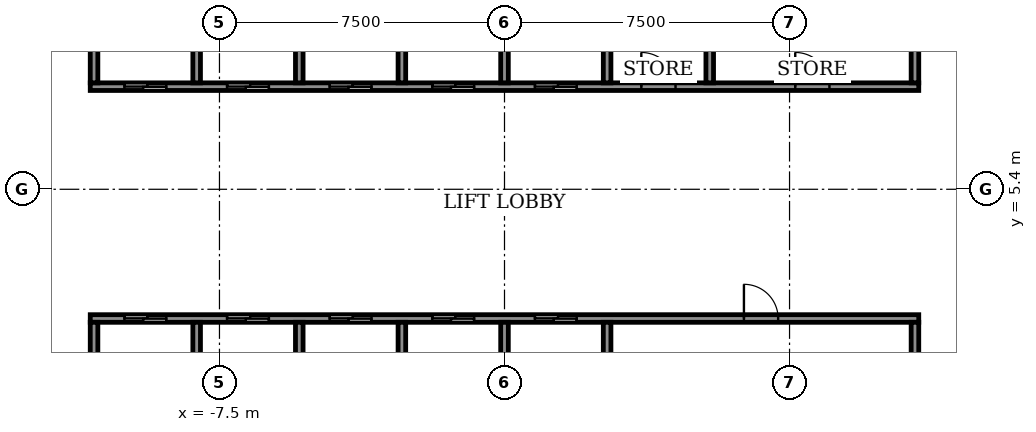
"""IFC4 building model, lengths in metres.
Left out: names, types, materials, properties, quantities, classifications, styles, units other than length and angle.
Written with IfcOpenShell. Run it as: python <this file> out.ifc"""

import sys

from ifc_helpers import new_model, si_unit, direction, frame, frame_2d, origin, place, context, subcontext, project, spatial, rectangle, extrude, element, fill, save


model = new_model("IFC4")
c1 = context("Model", 3, precision=1e-05, world=origin(), true_north=direction((0.0, 1.0)))
c2 = subcontext(c1, "Body", "Model", "MODEL_VIEW")
j1 = project(units=[si_unit("LENGTHUNIT", "METRE"), si_unit("PLANEANGLEUNIT", "RADIAN")], contexts=[c1])
p1 = place(None, origin())
s1 = spatial("IfcSite", under=j1, at=p1, CompositionType="ELEMENT")
p2 = place(p1, origin())
s2 = spatial("IfcBuilding", under=s1, at=p2, CompositionType="ELEMENT")
p3 = place(p2, frame((0.0, 0.0, 20.5)))
s3 = spatial("IfcBuildingStorey", under=s2, at=p3, CompositionType="ELEMENT", Elevation=20.5)
p4 = place(p3, frame((-10.9, 2.0, 0.0), z_axis=(0.0, 0.0, 1.0), x_axis=(1.0, 0.0, 0.0)))
e1 = element("IfcWall", 1, at=p4, inside=s3, PredefinedType="SHEAR", context=c2, shape_type="SweptSolid", body=[
    extrude(rectangle(XDim=21.8, YDim=0.2, at=frame_2d((10.9, 0.0))), origin(), (0.0, 0.0, 1.0), 3.95),
])
p5 = place(p4, frame((0.9, 0.0, 0.0)))
e2 = element("IfcOpeningElement", 2, at=p5, cuts=e1, PredefinedType="OPENING", context=c2, shape_type="SweptSolid", body=[
    extrude(rectangle(XDim=1.1, YDim=2.1, at=frame_2d((0.55, 1.05))), frame((0.0, 0.11, 0.0), z_axis=(0.0, -1.0, 0.0), x_axis=(1.0, 0.0, 0.0)), (0.0, 0.0, 1.0), 0.22),
])
p6 = place(p4, frame((3.6, 0.0, 0.0)))
e3 = element("IfcOpeningElement", 3, at=p6, cuts=e1, PredefinedType="OPENING", context=c2, shape_type="SweptSolid", body=[
    extrude(rectangle(XDim=1.1, YDim=2.1, at=frame_2d((0.55, 1.05))), frame((0.0, 0.11, 0.0), z_axis=(0.0, -1.0, 0.0), x_axis=(1.0, 0.0, 0.0)), (0.0, 0.0, 1.0), 0.22),
])
p7 = place(p4, frame((6.3, 0.0, 0.0)))
e4 = element("IfcOpeningElement", 4, at=p7, cuts=e1, PredefinedType="OPENING", context=c2, shape_type="SweptSolid", body=[
    extrude(rectangle(XDim=1.1, YDim=2.1, at=frame_2d((0.55, 1.05))), frame((0.0, 0.11, 0.0), z_axis=(0.0, -1.0, 0.0), x_axis=(1.0, 0.0, 0.0)), (0.0, 0.0, 1.0), 0.22),
])
p8 = place(p4, frame((9.0, 0.0, 0.0)))
e5 = element("IfcOpeningElement", 5, at=p8, cuts=e1, PredefinedType="OPENING", context=c2, shape_type="SweptSolid", body=[
    extrude(rectangle(XDim=1.1, YDim=2.1, at=frame_2d((0.55, 1.05))), frame((0.0, 0.11, 0.0), z_axis=(0.0, -1.0, 0.0), x_axis=(1.0, 0.0, 0.0)), (0.0, 0.0, 1.0), 0.22),
])
p9 = place(p4, frame((11.7, 0.0, 0.0)))
e6 = element("IfcOpeningElement", 6, at=p9, cuts=e1, PredefinedType="OPENING", context=c2, shape_type="SweptSolid", body=[
    extrude(rectangle(XDim=1.1, YDim=2.1, at=frame_2d((0.55, 1.05))), frame((0.0, 0.11, 0.0), z_axis=(0.0, -1.0, 0.0), x_axis=(1.0, 0.0, 0.0)), (0.0, 0.0, 1.0), 0.22),
])
p10 = place(p4, frame((17.2, 0.0, 0.0)))
e7 = element("IfcOpeningElement", 7, at=p10, cuts=e1, PredefinedType="OPENING", context=c2, shape_type="SweptSolid", body=[
    extrude(rectangle(XDim=0.9, YDim=2.1, at=frame_2d((0.45, 1.05))), frame((0.0, 0.11, 0.0), z_axis=(0.0, -1.0, 0.0), x_axis=(1.0, 0.0, 0.0)), (0.0, 0.0, 1.0), 0.22),
])
p11 = place(p3, frame((-10.9, 8.1, 0.0), z_axis=(0.0, 0.0, 1.0), x_axis=(1.0, 0.0, 0.0)))
e8 = element("IfcWall", 8, at=p11, inside=s3, PredefinedType="SHEAR", context=c2, shape_type="SweptSolid", body=[
    extrude(rectangle(XDim=21.8, YDim=0.2, at=frame_2d((10.9, 0.0))), origin(), (0.0, 0.0, 1.0), 3.95),
])
p12 = place(p11, frame((0.9, 0.0, 0.0)))
e9 = element("IfcOpeningElement", 9, at=p12, cuts=e8, PredefinedType="OPENING", context=c2, shape_type="SweptSolid", body=[
    extrude(rectangle(XDim=1.1, YDim=2.1, at=frame_2d((0.55, 1.05))), frame((0.0, 0.11, 0.0), z_axis=(0.0, -1.0, 0.0), x_axis=(1.0, 0.0, 0.0)), (0.0, 0.0, 1.0), 0.22),
])
p13 = place(p11, frame((3.6, 0.0, 0.0)))
e10 = element("IfcOpeningElement", 10, at=p13, cuts=e8, PredefinedType="OPENING", context=c2, shape_type="SweptSolid", body=[
    extrude(rectangle(XDim=1.1, YDim=2.1, at=frame_2d((0.55, 1.05))), frame((0.0, 0.11, 0.0), z_axis=(0.0, -1.0, 0.0), x_axis=(1.0, 0.0, 0.0)), (0.0, 0.0, 1.0), 0.22),
])
p14 = place(p11, frame((6.3, 0.0, 0.0)))
e11 = element("IfcOpeningElement", 11, at=p14, cuts=e8, PredefinedType="OPENING", context=c2, shape_type="SweptSolid", body=[
    extrude(rectangle(XDim=1.1, YDim=2.1, at=frame_2d((0.55, 1.05))), frame((0.0, 0.11, 0.0), z_axis=(0.0, -1.0, 0.0), x_axis=(1.0, 0.0, 0.0)), (0.0, 0.0, 1.0), 0.22),
])
p15 = place(p11, frame((9.0, 0.0, 0.0)))
e12 = element("IfcOpeningElement", 12, at=p15, cuts=e8, PredefinedType="OPENING", context=c2, shape_type="SweptSolid", body=[
    extrude(rectangle(XDim=1.1, YDim=2.1, at=frame_2d((0.55, 1.05))), frame((0.0, 0.11, 0.0), z_axis=(0.0, -1.0, 0.0), x_axis=(1.0, 0.0, 0.0)), (0.0, 0.0, 1.0), 0.22),
])
p16 = place(p11, frame((11.7, 0.0, 0.0)))
e13 = element("IfcOpeningElement", 13, at=p16, cuts=e8, PredefinedType="OPENING", context=c2, shape_type="SweptSolid", body=[
    extrude(rectangle(XDim=1.1, YDim=2.1, at=frame_2d((0.55, 1.05))), frame((0.0, 0.11, 0.0), z_axis=(0.0, -1.0, 0.0), x_axis=(1.0, 0.0, 0.0)), (0.0, 0.0, 1.0), 0.22),
])
p17 = place(p11, frame((14.5, 0.0, 0.0)))
e14 = element("IfcOpeningElement", 14, at=p17, cuts=e8, PredefinedType="OPENING", context=c2, shape_type="SweptSolid", body=[
    extrude(rectangle(XDim=0.9, YDim=2.1, at=frame_2d((0.45, 1.05))), frame((0.0, 0.11, 0.0), z_axis=(0.0, -1.0, 0.0), x_axis=(1.0, 0.0, 0.0)), (0.0, 0.0, 1.0), 0.22),
])
p18 = place(p11, frame((18.55, 0.0, 0.0)))
e15 = element("IfcOpeningElement", 15, at=p18, cuts=e8, PredefinedType="OPENING", context=c2, shape_type="SweptSolid", body=[
    extrude(rectangle(XDim=0.9, YDim=2.1, at=frame_2d((0.45, 1.05))), frame((0.0, 0.11, 0.0), z_axis=(0.0, -1.0, 0.0), x_axis=(1.0, 0.0, 0.0)), (0.0, 0.0, 1.0), 0.22),
])
for number, where, z_axis, x_axis in (
    (16, (-10.8, -0.6, 0.0), (0.0, 0.0, 1.0), (0.0, 1.0, 0.0)),
    (17, (-8.1, -0.6, 0.0), (0.0, 0.0, 1.0), (0.0, 1.0, 0.0)),
    (18, (-5.4, -0.6, 0.0), (0.0, 0.0, 1.0), (0.0, 1.0, 0.0)),
    (19, (-2.7, -0.6, 0.0), (0.0, 0.0, 1.0), (0.0, 1.0, 0.0)),
    (20, (0.0, -0.6, 0.0), (0.0, 0.0, 1.0), (0.0, 1.0, 0.0)),
    (21, (2.7, -0.6, 0.0), (0.0, 0.0, 1.0), (0.0, 1.0, 0.0)),
):
    element("IfcWall", number, at=place(p3, frame(where, z_axis=z_axis, x_axis=x_axis)), inside=s3, PredefinedType="SHEAR", context=c2, shape_type="SweptSolid", body=[
        extrude(rectangle(XDim=2.5, YDim=0.2, at=frame_2d((1.25, 0.0))), origin(), (0.0, 0.0, 1.0), 3.95),
    ])
p19 = place(p3, frame((10.8, -0.6, 0.0), z_axis=(0.0, 0.0, 1.0), x_axis=(0.0, 1.0, 0.0)))
e22 = element("IfcWall", 22, at=p19, inside=s3, PredefinedType="STANDARD", context=c2, shape_type="SweptSolid", body=[
    extrude(rectangle(XDim=2.5, YDim=0.2, at=frame_2d((1.25, 0.0))), origin(), (0.0, 0.0, 1.0), 3.95),
])
for number, where, z_axis, x_axis in (
    (23, (-10.8, 8.2, 0.0), (0.0, 0.0, 1.0), (0.0, 1.0, 0.0)),
    (24, (-8.1, 8.2, 0.0), (0.0, 0.0, 1.0), (0.0, 1.0, 0.0)),
    (25, (-5.4, 8.2, 0.0), (0.0, 0.0, 1.0), (0.0, 1.0, 0.0)),
    (26, (-2.7, 8.2, 0.0), (0.0, 0.0, 1.0), (0.0, 1.0, 0.0)),
    (27, (0.0, 8.2, 0.0), (0.0, 0.0, 1.0), (0.0, 1.0, 0.0)),
    (28, (2.7, 8.2, 0.0), (0.0, 0.0, 1.0), (0.0, 1.0, 0.0)),
):
    element("IfcWall", number, at=place(p3, frame(where, z_axis=z_axis, x_axis=x_axis)), inside=s3, PredefinedType="SHEAR", context=c2, shape_type="SweptSolid", body=[
        extrude(rectangle(XDim=2.6, YDim=0.2, at=frame_2d((1.3, 0.0))), origin(), (0.0, 0.0, 1.0), 3.95),
    ])
for number, where, z_axis, x_axis in (
    (29, (5.4, 8.2, 0.0), (0.0, 0.0, 1.0), (0.0, 1.0, 0.0)),
    (30, (10.8, 8.2, 0.0), (0.0, 0.0, 1.0), (0.0, 1.0, 0.0)),
):
    element("IfcWall", number, at=place(p3, frame(where, z_axis=z_axis, x_axis=x_axis)), inside=s3, PredefinedType="STANDARD", context=c2, shape_type="SweptSolid", body=[
        extrude(rectangle(XDim=2.6, YDim=0.2, at=frame_2d((1.3, 0.0))), origin(), (0.0, 0.0, 1.0), 3.95),
    ])
p20 = place(p5, origin())
e31 = element("IfcDoor", 31, at=p20, inside=s3, OperationType="SLIDING_TO_LEFT", PredefinedType="DOOR", context=c2, shape_type="SweptSolid", body=[
    extrude(rectangle(XDim=1.1, YDim=2.1, at=frame_2d((0.55, 1.05))), frame((0.0, 0.025, 0.0), z_axis=(0.0, -1.0, 0.0), x_axis=(1.0, 0.0, 0.0)), (0.0, 0.0, 1.0), 0.05),
])
fill(e2, e31)
p21 = place(p6, origin())
e32 = element("IfcDoor", 32, at=p21, inside=s3, OperationType="SLIDING_TO_LEFT", PredefinedType="DOOR", context=c2, shape_type="SweptSolid", body=[
    extrude(rectangle(XDim=1.1, YDim=2.1, at=frame_2d((0.55, 1.05))), frame((0.0, 0.025, 0.0), z_axis=(0.0, -1.0, 0.0), x_axis=(1.0, 0.0, 0.0)), (0.0, 0.0, 1.0), 0.05),
])
fill(e3, e32)
p22 = place(p7, origin())
e33 = element("IfcDoor", 33, at=p22, inside=s3, OperationType="SLIDING_TO_LEFT", PredefinedType="DOOR", context=c2, shape_type="SweptSolid", body=[
    extrude(rectangle(XDim=1.1, YDim=2.1, at=frame_2d((0.55, 1.05))), frame((0.0, 0.025, 0.0), z_axis=(0.0, -1.0, 0.0), x_axis=(1.0, 0.0, 0.0)), (0.0, 0.0, 1.0), 0.05),
])
fill(e4, e33)
p23 = place(p8, origin())
e34 = element("IfcDoor", 34, at=p23, inside=s3, OperationType="SLIDING_TO_LEFT", PredefinedType="DOOR", context=c2, shape_type="SweptSolid", body=[
    extrude(rectangle(XDim=1.1, YDim=2.1, at=frame_2d((0.55, 1.05))), frame((0.0, 0.025, 0.0), z_axis=(0.0, -1.0, 0.0), x_axis=(1.0, 0.0, 0.0)), (0.0, 0.0, 1.0), 0.05),
])
fill(e5, e34)
p24 = place(p9, origin())
e35 = element("IfcDoor", 35, at=p24, inside=s3, OperationType="SLIDING_TO_LEFT", PredefinedType="DOOR", context=c2, shape_type="SweptSolid", body=[
    extrude(rectangle(XDim=1.1, YDim=2.1, at=frame_2d((0.55, 1.05))), frame((0.0, 0.025, 0.0), z_axis=(0.0, -1.0, 0.0), x_axis=(1.0, 0.0, 0.0)), (0.0, 0.0, 1.0), 0.05),
])
fill(e6, e35)
p25 = place(p12, origin())
e36 = element("IfcDoor", 36, at=p25, inside=s3, OperationType="SLIDING_TO_LEFT", PredefinedType="DOOR", context=c2, shape_type="SweptSolid", body=[
    extrude(rectangle(XDim=1.1, YDim=2.1, at=frame_2d((0.55, 1.05))), frame((0.0, 0.025, 0.0), z_axis=(0.0, -1.0, 0.0), x_axis=(1.0, 0.0, 0.0)), (0.0, 0.0, 1.0), 0.05),
])
fill(e9, e36)
p26 = place(p13, origin())
e37 = element("IfcDoor", 37, at=p26, inside=s3, OperationType="SLIDING_TO_LEFT", PredefinedType="DOOR", context=c2, shape_type="SweptSolid", body=[
    extrude(rectangle(XDim=1.1, YDim=2.1, at=frame_2d((0.55, 1.05))), frame((0.0, 0.025, 0.0), z_axis=(0.0, -1.0, 0.0), x_axis=(1.0, 0.0, 0.0)), (0.0, 0.0, 1.0), 0.05),
])
fill(e10, e37)
p27 = place(p14, origin())
e38 = element("IfcDoor", 38, at=p27, inside=s3, OperationType="SLIDING_TO_LEFT", PredefinedType="DOOR", context=c2, shape_type="SweptSolid", body=[
    extrude(rectangle(XDim=1.1, YDim=2.1, at=frame_2d((0.55, 1.05))), frame((0.0, 0.025, 0.0), z_axis=(0.0, -1.0, 0.0), x_axis=(1.0, 0.0, 0.0)), (0.0, 0.0, 1.0), 0.05),
])
fill(e11, e38)
p28 = place(p15, origin())
e39 = element("IfcDoor", 39, at=p28, inside=s3, OperationType="SLIDING_TO_LEFT", PredefinedType="DOOR", context=c2, shape_type="SweptSolid", body=[
    extrude(rectangle(XDim=1.1, YDim=2.1, at=frame_2d((0.55, 1.05))), frame((0.0, 0.025, 0.0), z_axis=(0.0, -1.0, 0.0), x_axis=(1.0, 0.0, 0.0)), (0.0, 0.0, 1.0), 0.05),
])
fill(e12, e39)
p29 = place(p16, origin())
e40 = element("IfcDoor", 40, at=p29, inside=s3, OperationType="SLIDING_TO_LEFT", PredefinedType="DOOR", context=c2, shape_type="SweptSolid", body=[
    extrude(rectangle(XDim=1.1, YDim=2.1, at=frame_2d((0.55, 1.05))), frame((0.0, 0.025, 0.0), z_axis=(0.0, -1.0, 0.0), x_axis=(1.0, 0.0, 0.0)), (0.0, 0.0, 1.0), 0.05),
])
fill(e13, e40)
p30 = place(p10, origin())
e41 = element("IfcDoor", 41, at=p30, inside=s3, OperationType="SINGLE_SWING_RIGHT", PredefinedType="DOOR", context=c2, shape_type="SweptSolid", body=[
    extrude(rectangle(XDim=0.9, YDim=2.1, at=frame_2d((0.45, 1.05))), frame((0.0, 0.025, 0.0), z_axis=(0.0, -1.0, 0.0), x_axis=(1.0, 0.0, 0.0)), (0.0, 0.0, 1.0), 0.05),
])
fill(e7, e41)
p31 = place(p17, origin())
e42 = element("IfcDoor", 42, at=p31, inside=s3, OperationType="SINGLE_SWING_RIGHT", PredefinedType="DOOR", context=c2, shape_type="SweptSolid", body=[
    extrude(rectangle(XDim=0.9, YDim=2.1, at=frame_2d((0.45, 1.05))), frame((0.0, 0.025, 0.0), z_axis=(0.0, -1.0, 0.0), x_axis=(1.0, 0.0, 0.0)), (0.0, 0.0, 1.0), 0.05),
])
fill(e14, e42)
p32 = place(p18, origin())
e43 = element("IfcDoor", 43, at=p32, inside=s3, OperationType="SINGLE_SWING_RIGHT", PredefinedType="DOOR", context=c2, shape_type="SweptSolid", body=[
    extrude(rectangle(XDim=0.9, YDim=2.1, at=frame_2d((0.45, 1.05))), frame((0.0, 0.025, 0.0), z_axis=(0.0, -1.0, 0.0), x_axis=(1.0, 0.0, 0.0)), (0.0, 0.0, 1.0), 0.05),
])
fill(e15, e43)
save(model, sys.argv[1])
